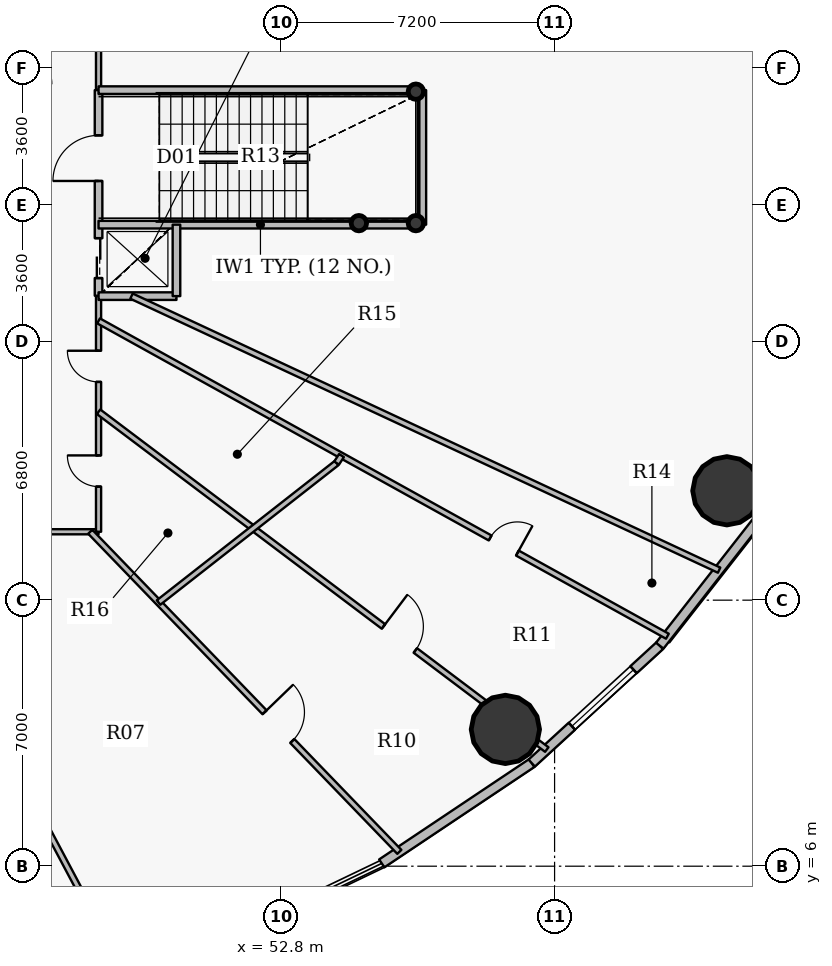
"""IFC4 building model, lengths in metres.
Left out: names, types, materials, properties, quantities, classifications, styles, units other than length and angle.
Written with IfcOpenShell. Run it as: python <this file> out.ifc"""

import sys

from ifc_helpers import new_model, si_unit, direction, frame, frame_2d, origin, origin_2d, place, context, subcontext, project, spatial, rectangle, hollow_circle, extrude, source, transform, mapped, element, fill, save


model = new_model("IFC4")
c1 = context("Model", 3, precision=1e-05, world=origin(), true_north=direction((0.0, 1.0)))
c2 = subcontext(c1, "Body", "Model", "MODEL_VIEW")
j1 = project(units=[si_unit("LENGTHUNIT", "METRE"), si_unit("PLANEANGLEUNIT", "RADIAN")], contexts=[c1])
p1 = place(None, origin())
s1 = spatial("IfcSite", under=j1, at=p1, CompositionType="ELEMENT")
p2 = place(p1, origin())
s2 = spatial("IfcBuilding", under=s1, at=p2, CompositionType="ELEMENT")
p3 = place(p2, frame((0.0, 0.0, 14.4)))
s3 = spatial("IfcBuildingStorey", under=s2, at=p3, CompositionType="ELEMENT", Elevation=14.4)
for number, where, z_axis, x_axis in (
    (1, (56.35, 26.38, 0.0), (0.0, 0.0, 1.0), (1.0, 0.0, 0.0)),
    (2, (56.35, 22.92, 0.0), (0.0, 0.0, 1.0), (1.0, 0.0, 0.0)),
    (3, (54.85, 22.92, 0.0), (0.0, 0.0, 1.0), (1.0, 0.0, 0.0)),
):
    element("IfcColumn", number, at=place(p3, frame(where, z_axis=z_axis, x_axis=x_axis)), inside=s3, PredefinedType="COLUMN", context=c2, shape_type="SweptSolid", body=[
        extrude(hollow_circle(Radius=0.203, WallThickness=0.016, at=origin_2d()), origin(), (0.0, 0.0, 1.0), 4.2),
    ])
for number, where, z_axis, x_axis in (
    (4, (58.705, 9.599, 0.0), (0.0, 0.0, 1.0), (1.0, 0.0, 0.0)),
    (5, (64.534, 15.878, 0.0), (0.0, 0.0, 1.0), (1.0, 0.0, 0.0)),
):
    element("IfcColumn", number, at=place(p3, frame(where, z_axis=z_axis, x_axis=x_axis)), inside=s3, PredefinedType="COLUMN", context=c2, shape_type="SweptSolid", body=[
        extrude(hollow_circle(Radius=0.9, WallThickness=0.05, at=origin_2d()), origin(), (0.0, 0.0, 1.0), 4.2),
    ])
p4 = place(p3, frame((59.399, 8.714, 0.0), z_axis=(0.0, 0.0, 1.0), x_axis=(-0.831218664812, -0.555945618985, 0.0)))
e6 = element("IfcWall", 6, at=p4, inside=s3, PredefinedType="SOLIDWALL", context=c2, shape_type="SweptSolid", body=[
    extrude(rectangle(XDim=4.748, YDim=0.25, at=frame_2d((2.374, 0.0))), origin(), (0.0, 0.0, 1.0), 3.9),
])
p5 = place(p3, frame((62.768, 11.802, 0.0), z_axis=(0.0, 0.0, 1.0), x_axis=(-0.737076532105, -0.675809282136, 0.0)))
e7 = element("IfcWall", 7, at=p5, inside=s3, PredefinedType="SOLIDWALL", context=c2, shape_type="SweptSolid", body=[
    extrude(rectangle(XDim=4.571, YDim=0.25, at=frame_2d((2.285, 0.0))), origin(), (0.0, 0.0, 1.0), 3.9),
])
p6 = place(p5, frame((0.936, 0.0, 0.9)))
e8 = element("IfcOpeningElement", 8, at=p6, cuts=e7, PredefinedType="OPENING", context=c2, shape_type="SweptSolid", body=[
    extrude(rectangle(XDim=2.2, YDim=2.0, at=origin_2d()), frame((1.1, 0.135, 1.0), z_axis=(0.0, -1.0, 0.0), x_axis=(1.0, 0.0, 0.0)), (0.0, 0.0, 1.0), 0.27),
])
p7 = place(p3, frame((65.477, 15.264, 0.0), z_axis=(0.0, 0.0, 1.0), x_axis=(-0.61622589112, -0.787569457961, 0.0)))
e9 = element("IfcWall", 9, at=p7, inside=s3, PredefinedType="SOLIDWALL", context=c2, shape_type="SweptSolid", body=[
    extrude(rectangle(XDim=4.396, YDim=0.25, at=frame_2d((2.198, 0.0))), origin(), (0.0, 0.0, 1.0), 3.9),
])
p8 = place(p3, frame((39.828, 19.8, 0.0), z_axis=(0.0, 0.0, 1.0), x_axis=(0.469463695446, -0.882951775953, 0.0)))
e10 = element("IfcWall", 10, at=p8, inside=s3, PredefinedType="PARTITIONING", context=c2, shape_type="SweptSolid", body=[
    extrude(rectangle(XDim=18.824, YDim=0.15, at=frame_2d((9.412, 0.0))), origin(), (0.0, 0.0, 1.0), 3.085),
])
p9 = place(p3, frame((46.05, 14.8, 0.0), z_axis=(0.0, 0.0, 1.0), x_axis=(1.0, 0.0, 0.0)))
e11 = element("IfcWall", 11, at=p9, inside=s3, PredefinedType="PARTITIONING", context=c2, shape_type="SweptSolid", body=[
    extrude(rectangle(XDim=1.95, YDim=0.135, at=frame_2d((0.975, 0.0))), origin(), (0.0, 0.0, 1.0), 3.9),
])
p10 = place(p3, frame((47.781, 14.8, 0.0), z_axis=(0.0, 0.0, 1.0), x_axis=(0.694655165544, -0.719342895275, 0.0)))
e12 = element("IfcWall", 12, at=p10, inside=s3, PredefinedType="PARTITIONING", context=c2, shape_type="SweptSolid", body=[
    extrude(rectangle(XDim=11.709, YDim=0.15, at=frame_2d((5.854, 0.0))), origin(), (0.0, 0.0, 1.0), 3.085),
])
p11 = place(p10, frame((6.603, 0.0, 0.0)))
e13 = element("IfcOpeningElement", 13, at=p11, cuts=e12, PredefinedType="OPENING", context=c2, shape_type="SweptSolid", body=[
    extrude(rectangle(XDim=1.05, YDim=2.15, at=origin_2d()), frame((0.525, 0.085, 1.075), z_axis=(0.0, -1.0, 0.0), x_axis=(1.0, 0.0, 0.0)), (0.0, 0.0, 1.0), 0.17),
])
p12 = place(p3, frame((48.0, 14.8, 0.0), z_axis=(0.0, 0.0, 1.0), x_axis=(0.0, 1.0, 0.0)))
e14 = element("IfcWall", 14, at=p12, inside=s3, PredefinedType="PARTITIONING", context=c2, shape_type="SweptSolid", body=[
    extrude(rectangle(XDim=6.2, YDim=0.135, at=frame_2d((3.1, 0.0))), origin(), (0.0, 0.0, 1.0), 3.085),
])
p13 = place(p12, frame((1.189, 0.0, 0.0)))
e15 = element("IfcOpeningElement", 15, at=p13, cuts=e14, PredefinedType="OPENING", context=c2, shape_type="SweptSolid", body=[
    extrude(rectangle(XDim=0.82, YDim=2.1, at=origin_2d()), frame((0.41, 0.078, 1.05), z_axis=(0.0, -1.0, 0.0), x_axis=(1.0, 0.0, 0.0)), (0.0, 0.0, 1.0), 0.155),
])
p14 = place(p12, frame((3.943, 0.0, 0.0)))
e16 = element("IfcOpeningElement", 16, at=p14, cuts=e14, PredefinedType="OPENING", context=c2, shape_type="SweptSolid", body=[
    extrude(rectangle(XDim=0.82, YDim=2.1, at=origin_2d()), frame((0.41, 0.078, 1.05), z_axis=(0.0, -1.0, 0.0), x_axis=(1.0, 0.0, 0.0)), (0.0, 0.0, 1.0), 0.155),
])
p15 = place(p3, frame((48.0, 17.957, 0.0), z_axis=(0.0, 0.0, 1.0), x_axis=(0.798637068648, -0.601812954814, 0.0)))
e17 = element("IfcWall", 17, at=p15, inside=s3, PredefinedType="PARTITIONING", context=c2, shape_type="SweptSolid", body=[
    extrude(rectangle(XDim=14.768, YDim=0.15, at=frame_2d((7.384, 0.0))), origin(), (0.0, 0.0, 1.0), 3.085),
])
p16 = place(p15, frame((9.388, 0.0, 0.0)))
e18 = element("IfcOpeningElement", 18, at=p16, cuts=e17, PredefinedType="OPENING", context=c2, shape_type="SweptSolid", body=[
    extrude(rectangle(XDim=1.05, YDim=2.15, at=origin_2d()), frame((0.525, 0.085, 1.075), z_axis=(0.0, -1.0, 0.0), x_axis=(1.0, 0.0, 0.0)), (0.0, 0.0, 1.0), 0.17),
])
p17 = place(p3, frame((48.0, 20.348, 0.0), z_axis=(0.0, 0.0, 1.0), x_axis=(0.874615123646, -0.484817888996, 0.0)))
e19 = element("IfcWall", 19, at=p17, inside=s3, PredefinedType="PARTITIONING", context=c2, shape_type="SweptSolid", body=[
    extrude(rectangle(XDim=17.115, YDim=0.15, at=frame_2d((8.557, 0.0))), origin(), (0.0, 0.0, 1.0), 3.085),
])
p18 = place(p17, frame((11.781, 0.0, 0.0)))
e20 = element("IfcOpeningElement", 20, at=p18, cuts=e19, PredefinedType="OPENING", context=c2, shape_type="SweptSolid", body=[
    extrude(rectangle(XDim=0.82, YDim=2.1, at=origin_2d()), frame((0.41, 0.085, 1.05), z_axis=(0.0, -1.0, 0.0), x_axis=(1.0, 0.0, 0.0)), (0.0, 0.0, 1.0), 0.17),
])
p19 = place(p3, frame((48.0, 21.01, 0.0), z_axis=(0.0, 0.0, 1.0), x_axis=(0.0, 1.0, 0.0)))
e21 = element("IfcWall", 21, at=p19, inside=s3, PredefinedType="PARTITIONING", context=c2, shape_type="SweptSolid", body=[
    extrude(rectangle(XDim=5.41, YDim=0.2, at=frame_2d((2.705, 0.0))), origin(), (0.0, 0.0, 1.0), 3.085),
])
p20 = place(p19, frame((3.02, 0.0, 0.0)))
e22 = element("IfcOpeningElement", 22, at=p20, cuts=e21, PredefinedType="OPENING", context=c2, shape_type="SweptSolid", body=[
    extrude(rectangle(XDim=1.2, YDim=2.15, at=origin_2d()), frame((0.6, 0.11, 1.075), z_axis=(0.0, -1.0, 0.0), x_axis=(1.0, 0.0, 0.0)), (0.0, 0.0, 1.0), 0.22),
])
p21 = place(p19, frame((0.465, 0.0, 0.0)))
e23 = element("IfcOpeningElement", 23, at=p21, cuts=e21, PredefinedType="OPENING", context=c2, shape_type="SweptSolid", body=[
    extrude(rectangle(XDim=1.05, YDim=2.15, at=origin_2d()), frame((0.525, 0.11, 1.075), z_axis=(0.0, -1.0, 0.0), x_axis=(1.0, 0.0, 0.0)), (0.0, 0.0, 1.0), 0.22),
])
p22 = place(p3, frame((48.0, 21.0, 0.0), z_axis=(0.0, 0.0, 1.0), x_axis=(1.0, 0.0, 0.0)))
e24 = element("IfcWall", 24, at=p22, inside=s3, PredefinedType="PARTITIONING", context=c2, shape_type="SweptSolid", body=[
    extrude(rectangle(XDim=2.05, YDim=0.2, at=frame_2d((1.025, 0.0))), origin(), (0.0, 0.0, 1.0), 3.9),
])
p23 = place(p3, frame((48.0, 22.88, 0.0), z_axis=(0.0, 0.0, 1.0), x_axis=(1.0, 0.0, 0.0)))
e25 = element("IfcWall", 25, at=p23, inside=s3, PredefinedType="PARTITIONING", context=c2, shape_type="SweptSolid", body=[
    extrude(rectangle(XDim=8.52, YDim=0.2, at=frame_2d((4.26, 0.0))), origin(), (0.0, 0.0, 1.0), 3.9),
])
p24 = place(p3, frame((48.0, 26.43, 0.0), z_axis=(0.0, 0.0, 1.0), x_axis=(0.0, 1.0, 0.0)))
e26 = element("IfcWall", 26, at=p24, inside=s3, PredefinedType="PARTITIONING", context=c2, shape_type="SweptSolid", body=[
    extrude(rectangle(XDim=14.77, YDim=0.135, at=frame_2d((7.385, 0.0))), origin(), (0.0, 0.0, 1.0), 3.085),
])
p25 = place(p24, frame((3.244, 0.0, 0.0)))
e27 = element("IfcOpeningElement", 27, at=p25, cuts=e26, PredefinedType="OPENING", context=c2, shape_type="SweptSolid", body=[
    extrude(rectangle(XDim=1.05, YDim=2.15, at=origin_2d()), frame((0.525, 0.078, 1.075), z_axis=(0.0, -1.0, 0.0), x_axis=(1.0, 0.0, 0.0)), (0.0, 0.0, 1.0), 0.155),
])
p26 = place(p24, frame((10.589, 0.0, 0.0)))
e28 = element("IfcOpeningElement", 28, at=p26, cuts=e26, PredefinedType="OPENING", context=c2, shape_type="SweptSolid", body=[
    extrude(rectangle(XDim=1.05, YDim=2.15, at=origin_2d()), frame((0.525, 0.078, 1.075), z_axis=(0.0, -1.0, 0.0), x_axis=(1.0, 0.0, 0.0)), (0.0, 0.0, 1.0), 0.155),
])
p27 = place(p3, frame((48.0, 26.42, 0.0), z_axis=(0.0, 0.0, 1.0), x_axis=(1.0, 0.0, 0.0)))
e29 = element("IfcWall", 29, at=p27, inside=s3, PredefinedType="PARTITIONING", context=c2, shape_type="SweptSolid", body=[
    extrude(rectangle(XDim=8.52, YDim=0.2, at=frame_2d((4.26, 0.0))), origin(), (0.0, 0.0, 1.0), 3.9),
])
p28 = place(p3, frame((48.867, 21.0, 0.0), z_axis=(0.0, 0.0, 1.0), x_axis=(0.906305939421, -0.422622223942, 0.0)))
e30 = element("IfcWall", 30, at=p28, inside=s3, PredefinedType="PARTITIONING", context=c2, shape_type="SweptSolid", body=[
    extrude(rectangle(XDim=17.061, YDim=0.15, at=frame_2d((8.53, 0.0))), origin(), (0.0, 0.0, 1.0), 3.085),
])
p29 = place(p3, frame((49.579, 12.939, 0.0), z_axis=(0.0, 0.0, 1.0), x_axis=(0.787322308609, 0.616541630684, 0.0)))
e31 = element("IfcWall", 31, at=p29, inside=s3, PredefinedType="PARTITIONING", context=c2, shape_type="SweptSolid", body=[
    extrude(rectangle(XDim=5.951, YDim=0.15, at=frame_2d((2.976, 0.0))), origin(), (0.0, 0.0, 1.0), 3.085),
])
p30 = place(p3, frame((50.05, 21.0, 0.0), z_axis=(0.0, 0.0, 1.0), x_axis=(0.0, 1.0, 0.0)))
e32 = element("IfcWall", 32, at=p30, inside=s3, PredefinedType="PARTITIONING", context=c2, shape_type="SweptSolid", body=[
    extrude(rectangle(XDim=1.88, YDim=0.2, at=frame_2d((0.94, 0.0))), origin(), (0.0, 0.0, 1.0), 3.085),
])
p31 = place(p3, frame((54.264, 16.608, 0.0), z_axis=(0.0, 0.0, 1.0), x_axis=(0.545316895374, 0.838229970604, 0.0)))
e33 = element("IfcWall", 33, at=p31, inside=s3, PredefinedType="PARTITIONING", context=c2, shape_type="SweptSolid", body=[
    extrude(rectangle(XDim=0.235, YDim=0.15, at=frame_2d((0.118, 0.0))), origin(), (0.0, 0.0, 1.0), 3.9),
])
p32 = place(p3, frame((56.52, 22.88, 0.0), z_axis=(0.0, 0.0, 1.0), x_axis=(0.0, 1.0, 0.0)))
e34 = element("IfcWall", 34, at=p32, inside=s3, PredefinedType="PARTITIONING", context=c2, shape_type="SweptSolid", body=[
    extrude(rectangle(XDim=3.54, YDim=0.2, at=frame_2d((1.77, 0.0))), origin(), (0.0, 0.0, 1.0), 3.9),
])
m1 = source(origin(), c2, "Body", "SweptSolid", [
    extrude(rectangle(XDim=2.2, YDim=2.0, at=origin_2d()), frame((1.1, 0.03, 1.0), z_axis=(0.0, -1.0, 0.0), x_axis=(1.0, 0.0, 0.0)), (0.0, 0.0, 1.0), 0.06),
])
p33 = place(p6, origin())
e35 = element("IfcWindow", 35, at=p33, inside=s3, PartitioningType="TRIPLE_PANEL_VERTICAL", PredefinedType="WINDOW", context=c2, shape_type="MappedRepresentation", body=[
    mapped(m1, transform((0.0, 0.0, 0.0), x_axis=(1.0, 0.0, 0.0), y_axis=(0.0, 1.0, 0.0), z_axis=(0.0, 0.0, 1.0), scale=1.0)),
])
fill(e8, e35)
m2 = source(origin(), c2, "Body", "SweptSolid", [
    extrude(rectangle(XDim=1.2, YDim=2.15, at=origin_2d()), frame((0.6, 0.025, 1.075), z_axis=(0.0, -1.0, 0.0), x_axis=(1.0, 0.0, 0.0)), (0.0, 0.0, 1.0), 0.05),
])
p34 = place(p20, origin())
e36 = element("IfcDoor", 36, at=p34, inside=s3, OperationType="SINGLE_SWING_LEFT", PredefinedType="DOOR", context=c2, shape_type="MappedRepresentation", body=[
    mapped(m2, transform((0.0, 0.0, 0.0), x_axis=(1.0, 0.0, 0.0), y_axis=(0.0, 1.0, 0.0), z_axis=(0.0, 0.0, 1.0), scale=1.0)),
])
fill(e22, e36)
m3 = source(origin(), c2, "Body", "SweptSolid", [
    extrude(rectangle(XDim=1.05, YDim=2.15, at=origin_2d()), frame((0.525, 0.025, 1.075), z_axis=(0.0, -1.0, 0.0), x_axis=(1.0, 0.0, 0.0)), (0.0, 0.0, 1.0), 0.05),
])
p35 = place(p21, origin())
e37 = element("IfcDoor", 37, at=p35, inside=s3, OperationType="DOUBLE_DOOR_SLIDING", PredefinedType="USERDEFINED", context=c2, shape_type="MappedRepresentation", body=[
    mapped(m3, transform((0.0, 0.0, 0.0), x_axis=(1.0, 0.0, 0.0), y_axis=(0.0, 1.0, 0.0), z_axis=(0.0, 0.0, 1.0), scale=1.0)),
])
fill(e23, e37)
m4 = source(origin(), c2, "Body", "SweptSolid", [
    extrude(rectangle(XDim=0.82, YDim=2.1, at=origin_2d()), frame((0.41, 0.025, 1.05), z_axis=(0.0, -1.0, 0.0), x_axis=(1.0, 0.0, 0.0)), (0.0, 0.0, 1.0), 0.05),
])
p36 = place(p13, origin())
e38 = element("IfcDoor", 38, at=p36, inside=s3, OperationType="SINGLE_SWING_RIGHT", PredefinedType="DOOR", context=c2, shape_type="MappedRepresentation", body=[
    mapped(m4, transform((0.0, 0.0, 0.0), x_axis=(1.0, 0.0, 0.0), y_axis=(0.0, 1.0, 0.0), z_axis=(0.0, 0.0, 1.0), scale=1.0)),
])
fill(e15, e38)
m5 = source(origin(), c2, "Body", "SweptSolid", [
    extrude(rectangle(XDim=1.05, YDim=2.15, at=origin_2d()), frame((0.525, 0.025, 1.075), z_axis=(0.0, -1.0, 0.0), x_axis=(1.0, 0.0, 0.0)), (0.0, 0.0, 1.0), 0.05),
])
p37 = place(p11, origin())
e39 = element("IfcDoor", 39, at=p37, inside=s3, OperationType="SINGLE_SWING_LEFT", PredefinedType="DOOR", context=c2, shape_type="MappedRepresentation", body=[
    mapped(m5, transform((0.0, 0.0, 0.0), x_axis=(1.0, 0.0, 0.0), y_axis=(0.0, 1.0, 0.0), z_axis=(0.0, 0.0, 1.0), scale=1.0)),
])
fill(e13, e39)
p38 = place(p14, origin())
e40 = element("IfcDoor", 40, at=p38, inside=s3, OperationType="SINGLE_SWING_RIGHT", PredefinedType="DOOR", context=c2, shape_type="MappedRepresentation", body=[
    mapped(m4, transform((0.0, 0.0, 0.0), x_axis=(1.0, 0.0, 0.0), y_axis=(0.0, 1.0, 0.0), z_axis=(0.0, 0.0, 1.0), scale=1.0)),
])
fill(e16, e40)
p39 = place(p16, origin())
e41 = element("IfcDoor", 41, at=p39, inside=s3, OperationType="SINGLE_SWING_LEFT", PredefinedType="DOOR", context=c2, shape_type="MappedRepresentation", body=[
    mapped(m5, transform((0.0, 0.0, 0.0), x_axis=(1.0, 0.0, 0.0), y_axis=(0.0, 1.0, 0.0), z_axis=(0.0, 0.0, 1.0), scale=1.0)),
])
fill(e18, e41)
p40 = place(p18, origin())
e42 = element("IfcDoor", 42, at=p40, inside=s3, OperationType="SINGLE_SWING_RIGHT", PredefinedType="DOOR", context=c2, shape_type="MappedRepresentation", body=[
    mapped(m4, transform((0.0, 0.0, 0.0), x_axis=(1.0, 0.0, 0.0), y_axis=(0.0, 1.0, 0.0), z_axis=(0.0, 0.0, 1.0), scale=1.0)),
])
fill(e20, e42)
save(model, sys.argv[1])
